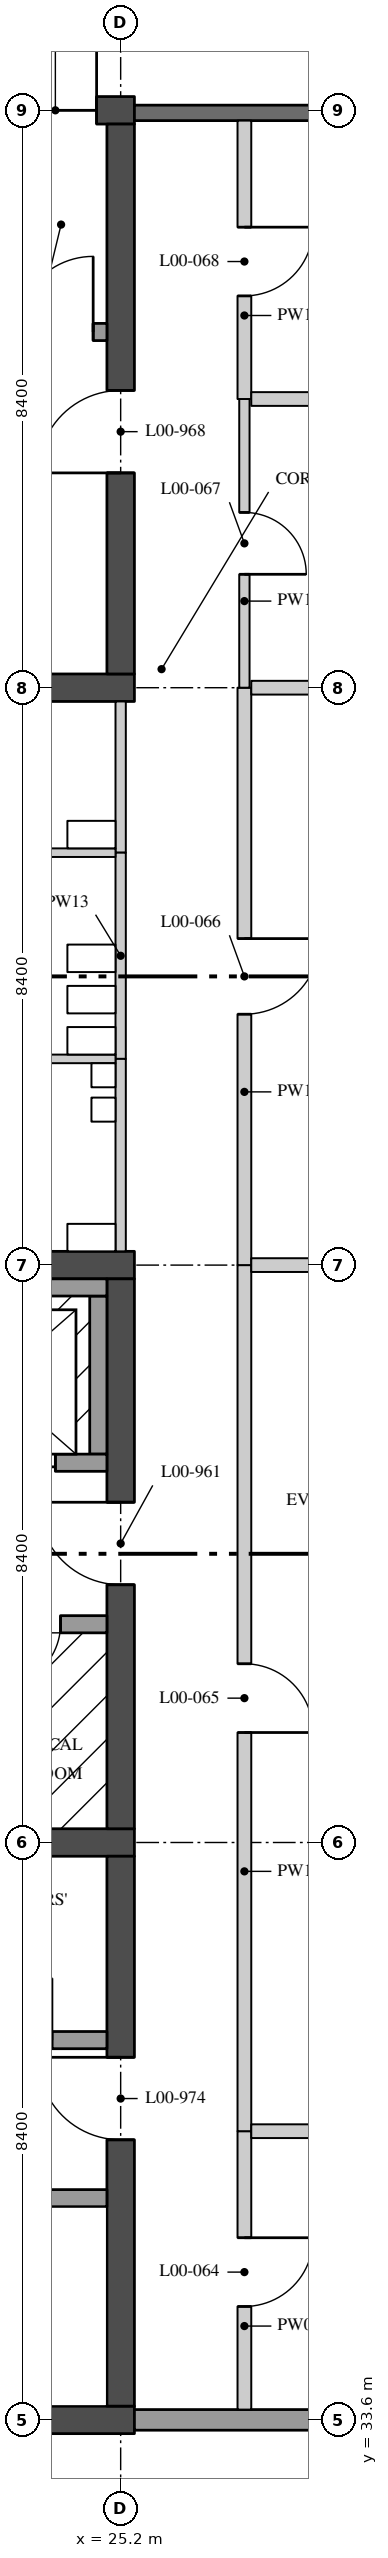
"""IFC4 building model, lengths in metres.
Left out: names, types, materials, properties, quantities, classifications, styles, units other than length and angle.
Written with IfcOpenShell. Run it as: python <this file> out.ifc"""

import sys

from ifc_helpers import new_model, si_unit, direction, frame, frame_2d, origin, place, context, subcontext, project, spatial, rectangle, extrude, element, fill, save


model = new_model("IFC4")
c1 = context("Model", 3, precision=1e-05, world=origin(), true_north=direction((0.0, 1.0)))
c2 = subcontext(c1, "Body", "Model", "MODEL_VIEW")
j1 = project(units=[si_unit("LENGTHUNIT", "METRE"), si_unit("PLANEANGLEUNIT", "RADIAN")], contexts=[c1])
p1 = place(None, origin())
s1 = spatial("IfcSite", under=j1, at=p1, CompositionType="ELEMENT")
p2 = place(p1, origin())
s2 = spatial("IfcBuilding", under=s1, at=p2, CompositionType="ELEMENT")
p3 = place(p2, origin())
s3 = spatial("IfcBuildingStorey", under=s2, at=p3, CompositionType="ELEMENT", Elevation=0.0)
p4 = place(p3, frame((16.6, 42.0, 0.0), z_axis=(0.0, 0.0, 1.0), x_axis=(1.0, 0.0, 0.0)))
e1 = element("IfcWall", 1, at=p4, inside=s3, PredefinedType="SHEAR", context=c2, shape_type="SweptSolid", body=[
    extrude(rectangle(XDim=8.8, YDim=0.4, at=frame_2d((4.4, 0.0))), origin(), (0.0, 0.0, 1.0), 5.05),
])
p5 = place(p4, frame((1.05, 0.0, 0.0)))
e2 = element("IfcOpeningElement", 2, at=p5, cuts=e1, PredefinedType="OPENING", context=c2, shape_type="SweptSolid", body=[
    extrude(rectangle(XDim=1.1, YDim=2.1, at=frame_2d((0.55, 1.05))), frame((0.0, 0.21, 0.0), z_axis=(0.0, -1.0, 0.0), x_axis=(1.0, 0.0, 0.0)), (0.0, 0.0, 1.0), 0.42),
])
p6 = place(p3, frame((16.6, 50.4, 0.0), z_axis=(0.0, 0.0, 1.0), x_axis=(1.0, 0.0, 0.0)))
e3 = element("IfcWall", 3, at=p6, inside=s3, PredefinedType="SHEAR", context=c2, shape_type="SweptSolid", body=[
    extrude(rectangle(XDim=8.8, YDim=0.4, at=frame_2d((4.4, 0.0))), origin(), (0.0, 0.0, 1.0), 5.05),
])
p7 = place(p3, frame((25.2, 42.2, 0.0), z_axis=(0.0, 0.0, 1.0), x_axis=(0.0, 1.0, 0.0)))
e4 = element("IfcWall", 4, at=p7, inside=s3, PredefinedType="SHEAR", context=c2, shape_type="SweptSolid", body=[
    extrude(rectangle(XDim=8.0, YDim=0.4, at=frame_2d((4.0, 0.0))), origin(), (0.0, 0.0, 1.0), 5.05),
])
p8 = place(p7, frame((3.55, 0.0, 0.0)))
e5 = element("IfcOpeningElement", 5, at=p8, cuts=e4, PredefinedType="OPENING", context=c2, shape_type="SweptSolid", body=[
    extrude(rectangle(XDim=1.2, YDim=2.1, at=frame_2d((0.6, 1.05))), frame((0.0, 0.21, 0.0), z_axis=(0.0, -1.0, 0.0), x_axis=(1.0, 0.0, 0.0)), (0.0, 0.0, 1.0), 0.42),
])
p9 = place(p3, frame((25.0, 45.175, 0.0), z_axis=(0.0, 0.0, 1.0), x_axis=(-1.0, 0.0, 0.0)))
e6 = element("IfcWall", 6, at=p9, inside=s3, PredefinedType="SOLIDWALL", context=c2, shape_type="SweptSolid", body=[
    extrude(rectangle(XDim=2.25, YDim=0.25, at=frame_2d((1.125, 0.0))), origin(), (0.0, 0.0, 1.0), 5.05),
])
p10 = place(p9, frame((0.675, 0.0, 0.0)))
e7 = element("IfcOpeningElement", 7, at=p10, cuts=e6, PredefinedType="OPENING", context=c2, shape_type="SweptSolid", body=[
    extrude(rectangle(XDim=0.9, YDim=2.1, at=frame_2d((0.45, 1.05))), frame((0.0, 0.135, 0.0), z_axis=(0.0, -1.0, 0.0), x_axis=(1.0, 0.0, 0.0)), (0.0, 0.0, 1.0), 0.27),
])
p11 = place(p3, frame((16.6, 58.8, 0.0), z_axis=(0.0, 0.0, 1.0), x_axis=(1.0, 0.0, 0.0)))
e8 = element("IfcWall", 8, at=p11, inside=s3, PredefinedType="SHEAR", context=c2, shape_type="SweptSolid", body=[
    extrude(rectangle(XDim=8.8, YDim=0.4, at=frame_2d((4.4, 0.0))), origin(), (0.0, 0.0, 1.0), 5.05),
])
p12 = place(p3, frame((16.6, 67.2, 0.0), z_axis=(0.0, 0.0, 1.0), x_axis=(1.0, 0.0, 0.0)))
e9 = element("IfcWall", 9, at=p12, inside=s3, PredefinedType="SHEAR", context=c2, shape_type="SweptSolid", body=[
    extrude(rectangle(XDim=8.8, YDim=0.4, at=frame_2d((4.4, 0.0))), origin(), (0.0, 0.0, 1.0), 5.05),
])
p13 = place(p12, frame((7.05, 0.0, 0.0)))
e10 = element("IfcOpeningElement", 10, at=p13, cuts=e9, PredefinedType="OPENING", context=c2, shape_type="SweptSolid", body=[
    extrude(rectangle(XDim=1.2, YDim=2.1, at=frame_2d((0.6, 1.05))), frame((0.0, 0.21, 0.0), z_axis=(0.0, -1.0, 0.0), x_axis=(1.0, 0.0, 0.0)), (0.0, 0.0, 1.0), 0.42),
])
p14 = place(p3, frame((25.2, 59.0, 0.0), z_axis=(0.0, 0.0, 1.0), x_axis=(0.0, 1.0, 0.0)))
e11 = element("IfcWall", 11, at=p14, inside=s3, PredefinedType="SHEAR", context=c2, shape_type="SweptSolid", body=[
    extrude(rectangle(XDim=8.0, YDim=0.4, at=frame_2d((4.0, 0.0))), origin(), (0.0, 0.0, 1.0), 5.05),
])
p15 = place(p14, frame((2.925, 0.0, 0.0)))
e12 = element("IfcOpeningElement", 12, at=p15, cuts=e11, PredefinedType="OPENING", context=c2, shape_type="SweptSolid", body=[
    extrude(rectangle(XDim=1.2, YDim=2.1, at=frame_2d((0.6, 1.05))), frame((0.0, 0.21, 0.0), z_axis=(0.0, -1.0, 0.0), x_axis=(1.0, 0.0, 0.0)), (0.0, 0.0, 1.0), 0.42),
])
p16 = place(p3, frame((25.0, 63.975, 0.0), z_axis=(0.0, 0.0, 1.0), x_axis=(-1.0, 0.0, 0.0)))
e13 = element("IfcWall", 13, at=p16, inside=s3, PredefinedType="SOLIDWALL", context=c2, shape_type="SweptSolid", body=[
    extrude(rectangle(XDim=8.0, YDim=0.25, at=frame_2d((4.0, 0.0))), origin(), (0.0, 0.0, 1.0), 5.05),
])
p17 = place(p16, frame((0.2, 0.0, 0.0)))
e14 = element("IfcOpeningElement", 14, at=p17, cuts=e13, PredefinedType="OPENING", context=c2, shape_type="SweptSolid", body=[
    extrude(rectangle(XDim=1.1, YDim=2.1, at=frame_2d((0.55, 1.05))), frame((0.0, 0.135, 0.0), z_axis=(0.0, -1.0, 0.0), x_axis=(1.0, 0.0, 0.0)), (0.0, 0.0, 1.0), 0.27),
])
p18 = place(p3, frame((16.6, 33.6, 0.0), z_axis=(0.0, 0.0, 1.0), x_axis=(1.0, 0.0, 0.0)))
e15 = element("IfcWall", 15, at=p18, inside=s3, PredefinedType="SHEAR", context=c2, shape_type="SweptSolid", body=[
    extrude(rectangle(XDim=8.8, YDim=0.4, at=frame_2d((4.4, 0.0))), origin(), (0.0, 0.0, 1.0), 5.05),
])
p19 = place(p3, frame((25.2, 33.8, 0.0), z_axis=(0.0, 0.0, 1.0), x_axis=(0.0, 1.0, 0.0)))
e16 = element("IfcWall", 16, at=p19, inside=s3, PredefinedType="SHEAR", context=c2, shape_type="SweptSolid", body=[
    extrude(rectangle(XDim=8.0, YDim=0.4, at=frame_2d((4.0, 0.0))), origin(), (0.0, 0.0, 1.0), 5.05),
])
p20 = place(p19, frame((3.875, 0.0, 0.0)))
e17 = element("IfcOpeningElement", 17, at=p20, cuts=e16, PredefinedType="OPENING", context=c2, shape_type="SweptSolid", body=[
    extrude(rectangle(XDim=1.2, YDim=2.1, at=frame_2d((0.6, 1.05))), frame((0.0, 0.21, 0.0), z_axis=(0.0, -1.0, 0.0), x_axis=(1.0, 0.0, 0.0)), (0.0, 0.0, 1.0), 0.42),
])
p21 = place(p3, frame((17.0, 36.825, 0.0), z_axis=(0.0, 0.0, 1.0), x_axis=(1.0, 0.0, 0.0)))
e18 = element("IfcWall", 18, at=p21, inside=s3, PredefinedType="SOLIDWALL", context=c2, shape_type="SweptSolid", body=[
    extrude(rectangle(XDim=8.0, YDim=0.25, at=frame_2d((4.0, 0.0))), origin(), (0.0, 0.0, 1.0), 5.05),
])
p22 = place(p21, frame((0.2, 0.0, 0.0)))
e19 = element("IfcOpeningElement", 19, at=p22, cuts=e18, PredefinedType="OPENING", context=c2, shape_type="SweptSolid", body=[
    extrude(rectangle(XDim=1.1, YDim=2.1, at=frame_2d((0.55, 1.05))), frame((0.0, 0.135, 0.0), z_axis=(0.0, -1.0, 0.0), x_axis=(1.0, 0.0, 0.0)), (0.0, 0.0, 1.0), 0.27),
])
p23 = place(p3, frame((19.65, 39.125, 0.0), z_axis=(0.0, 0.0, 1.0), x_axis=(1.0, 0.0, 0.0)))
e20 = element("IfcWall", 20, at=p23, inside=s3, PredefinedType="SOLIDWALL", context=c2, shape_type="SweptSolid", body=[
    extrude(rectangle(XDim=5.35, YDim=0.25, at=frame_2d((2.675, 0.0))), origin(), (0.0, 0.0, 1.0), 5.05),
])
p24 = place(p23, frame((3.65, 0.0, 0.0)))
e21 = element("IfcOpeningElement", 21, at=p24, cuts=e20, PredefinedType="OPENING", context=c2, shape_type="SweptSolid", body=[
    extrude(rectangle(XDim=0.9, YDim=2.1, at=frame_2d((0.45, 1.05))), frame((0.0, 0.135, 0.0), z_axis=(0.0, -1.0, 0.0), x_axis=(1.0, 0.0, 0.0)), (0.0, 0.0, 1.0), 0.27),
])
p25 = place(p23, frame((0.9, 0.0, 0.0)))
e22 = element("IfcOpeningElement", 22, at=p25, cuts=e20, PredefinedType="OPENING", context=c2, shape_type="SweptSolid", body=[
    extrude(rectangle(XDim=0.8, YDim=2.1, at=frame_2d((0.4, 1.05))), frame((0.0, 0.135, 0.0), z_axis=(0.0, -1.0, 0.0), x_axis=(1.0, 0.0, 0.0)), (0.0, 0.0, 1.0), 0.27),
])
p26 = place(p3, frame((24.875, 47.65, 0.0), z_axis=(0.0, 0.0, 1.0), x_axis=(0.0, 1.0, 0.0)))
e23 = element("IfcWall", 23, at=p26, inside=s3, PredefinedType="SOLIDWALL", context=c2, shape_type="SweptSolid", body=[
    extrude(rectangle(XDim=2.3, YDim=0.25, at=frame_2d((1.15, 0.0))), origin(), (0.0, 0.0, 1.0), 5.05),
])
p27 = place(p3, frame((21.7, 50.075, 0.0), z_axis=(0.0, 0.0, 1.0), x_axis=(1.0, 0.0, 0.0)))
e24 = element("IfcWall", 24, at=p27, inside=s3, PredefinedType="SOLIDWALL", context=c2, shape_type="SweptSolid", body=[
    extrude(rectangle(XDim=3.3, YDim=0.25, at=frame_2d((1.65, 0.0))), origin(), (0.0, 0.0, 1.0), 5.05),
])
p28 = place(p3, frame((21.7, 47.525, 0.0), z_axis=(0.0, 0.0, 1.0), x_axis=(1.0, 0.0, 0.0)))
e25 = element("IfcWall", 25, at=p28, inside=s3, PredefinedType="SOLIDWALL", context=c2, shape_type="SweptSolid", body=[
    extrude(rectangle(XDim=3.3, YDim=0.25, at=frame_2d((1.65, 0.0))), origin(), (0.0, 0.0, 1.0), 5.05),
])
p29 = place(p28, frame((0.75, 0.0, 0.0)))
e26 = element("IfcOpeningElement", 26, at=p29, cuts=e25, PredefinedType="OPENING", context=c2, shape_type="SweptSolid", body=[
    extrude(rectangle(XDim=1.8, YDim=2.1, at=frame_2d((0.9, 1.05))), frame((0.0, 0.135, 0.0), z_axis=(0.0, -1.0, 0.0), x_axis=(1.0, 0.0, 0.0)), (0.0, 0.0, 1.0), 0.27),
])
p30 = place(p3, frame((27.0, 33.75, 0.0), z_axis=(0.0, 0.0, 1.0), x_axis=(0.0, 1.0, 0.0)))
e27 = element("IfcWall", 27, at=p30, inside=s3, PredefinedType="PARTITIONING", context=c2, shape_type="SweptSolid", body=[
    extrude(rectangle(XDim=4.05, YDim=0.2, at=frame_2d((2.025, 0.0))), origin(), (0.0, 0.0, 1.0), 5.05),
])
p31 = place(p30, frame((1.5, 0.0, 0.0)))
e28 = element("IfcOpeningElement", 28, at=p31, cuts=e27, PredefinedType="OPENING", context=c2, shape_type="SweptSolid", body=[
    extrude(rectangle(XDim=1.0, YDim=2.4, at=frame_2d((0.5, 1.2))), frame((0.0, 0.11, 0.0), z_axis=(0.0, -1.0, 0.0), x_axis=(1.0, 0.0, 0.0)), (0.0, 0.0, 1.0), 0.22),
])
p32 = place(p3, frame((27.0, 37.8, 0.0), z_axis=(0.0, 0.0, 1.0), x_axis=(0.0, 1.0, 0.0)))
e29 = element("IfcWall", 29, at=p32, inside=s3, PredefinedType="PARTITIONING", context=c2, shape_type="SweptSolid", body=[
    extrude(rectangle(XDim=12.6, YDim=0.2, at=frame_2d((6.3, 0.0))), origin(), (0.0, 0.0, 1.0), 5.05),
])
p33 = place(p32, frame((5.8, 0.0, 0.0)))
e30 = element("IfcOpeningElement", 30, at=p33, cuts=e29, PredefinedType="OPENING", context=c2, shape_type="SweptSolid", body=[
    extrude(rectangle(XDim=1.0, YDim=2.1, at=frame_2d((0.5, 1.05))), frame((0.0, 0.11, 0.0), z_axis=(0.0, -1.0, 0.0), x_axis=(1.0, 0.0, 0.0)), (0.0, 0.0, 1.0), 0.22),
])
p34 = place(p3, frame((27.0, 50.4, 0.0), z_axis=(0.0, 0.0, 1.0), x_axis=(0.0, 1.0, 0.0)))
e31 = element("IfcWall", 31, at=p34, inside=s3, PredefinedType="PARTITIONING", context=c2, shape_type="SweptSolid", body=[
    extrude(rectangle(XDim=8.4, YDim=0.2, at=frame_2d((4.2, 0.0))), origin(), (0.0, 0.0, 1.0), 5.05),
])
p35 = place(p34, frame((3.65, 0.0, 0.0)))
e32 = element("IfcOpeningElement", 32, at=p35, cuts=e31, PredefinedType="OPENING", context=c2, shape_type="SweptSolid", body=[
    extrude(rectangle(XDim=1.1, YDim=2.1, at=frame_2d((0.55, 1.05))), frame((0.0, 0.11, 0.0), z_axis=(0.0, -1.0, 0.0), x_axis=(1.0, 0.0, 0.0)), (0.0, 0.0, 1.0), 0.22),
])
p36 = place(p3, frame((27.0, 58.8, 0.0), z_axis=(0.0, 0.0, 1.0), x_axis=(0.0, 1.0, 0.0)))
e33 = element("IfcWall", 33, at=p36, inside=s3, PredefinedType="PARTITIONING", context=c2, shape_type="SweptSolid", body=[
    extrude(rectangle(XDim=4.2, YDim=0.15, at=frame_2d((2.1, 0.0))), origin(), (0.0, 0.0, 1.0), 5.05),
])
p37 = place(p36, frame((1.65, 0.0, 0.0)))
e34 = element("IfcOpeningElement", 34, at=p37, cuts=e33, PredefinedType="OPENING", context=c2, shape_type="SweptSolid", body=[
    extrude(rectangle(XDim=0.9, YDim=2.1, at=frame_2d((0.45, 1.05))), frame((0.0, 0.085, 0.0), z_axis=(0.0, -1.0, 0.0), x_axis=(1.0, 0.0, 0.0)), (0.0, 0.0, 1.0), 0.17),
])
p38 = place(p3, frame((27.0, 63.0, 0.0), z_axis=(0.0, 0.0, 1.0), x_axis=(0.0, 1.0, 0.0)))
e35 = element("IfcWall", 35, at=p38, inside=s3, PredefinedType="PARTITIONING", context=c2, shape_type="SweptSolid", body=[
    extrude(rectangle(XDim=4.05, YDim=0.2, at=frame_2d((2.025, 0.0))), origin(), (0.0, 0.0, 1.0), 5.05),
])
p39 = place(p38, frame((1.5, 0.0, 0.0)))
e36 = element("IfcOpeningElement", 36, at=p39, cuts=e35, PredefinedType="OPENING", context=c2, shape_type="SweptSolid", body=[
    extrude(rectangle(XDim=1.0, YDim=2.1, at=frame_2d((0.5, 1.05))), frame((0.0, 0.11, 0.0), z_axis=(0.0, -1.0, 0.0), x_axis=(1.0, 0.0, 0.0)), (0.0, 0.0, 1.0), 0.22),
])
p40 = place(p3, frame((25.2, 56.4, 0.0), z_axis=(0.0, 0.0, 1.0), x_axis=(0.0, 1.0, 0.0)))
e37 = element("IfcWall", 37, at=p40, inside=s3, PredefinedType="PARTITIONING", context=c2, shape_type="SweptSolid", body=[
    extrude(rectangle(XDim=2.2, YDim=0.15, at=frame_2d((1.1, 0.0))), origin(), (0.0, 0.0, 1.0), 5.05),
])
p41 = place(p3, frame((25.2, 53.4, 0.0), z_axis=(0.0, 0.0, 1.0), x_axis=(0.0, 1.0, 0.0)))
e38 = element("IfcWall", 38, at=p41, inside=s3, PredefinedType="PARTITIONING", context=c2, shape_type="SweptSolid", body=[
    extrude(rectangle(XDim=3.0, YDim=0.15, at=frame_2d((1.5, 0.0))), origin(), (0.0, 0.0, 1.0), 5.05),
])
p42 = place(p3, frame((25.2, 50.6, 0.0), z_axis=(0.0, 0.0, 1.0), x_axis=(0.0, 1.0, 0.0)))
e39 = element("IfcWall", 39, at=p42, inside=s3, PredefinedType="PARTITIONING", context=c2, shape_type="SweptSolid", body=[
    extrude(rectangle(XDim=2.8, YDim=0.15, at=frame_2d((1.4, 0.0))), origin(), (0.0, 0.0, 1.0), 5.05),
])
p43 = place(p3, frame((27.1, 37.8, 0.0), z_axis=(0.0, 0.0, 1.0), x_axis=(1.0, 0.0, 0.0)))
e40 = element("IfcWall", 40, at=p43, inside=s3, PredefinedType="PARTITIONING", context=c2, shape_type="SweptSolid", body=[
    extrude(rectangle(XDim=6.35, YDim=0.2, at=frame_2d((3.175, 0.0))), origin(), (0.0, 0.0, 1.0), 5.05),
])
for number, where, z_axis, x_axis in (
    (41, (27.1, 50.4, 0.0), (0.0, 0.0, 1.0), (1.0, 0.0, 0.0)),
    (42, (27.1, 58.8, 0.0), (0.0, 0.0, 1.0), (1.0, 0.0, 0.0)),
):
    element("IfcWall", number, at=place(p3, frame(where, z_axis=z_axis, x_axis=x_axis)), inside=s3, PredefinedType="PARTITIONING", context=c2, shape_type="SweptSolid", body=[
        extrude(rectangle(XDim=6.05, YDim=0.2, at=frame_2d((3.025, 0.0))), origin(), (0.0, 0.0, 1.0), 5.05),
    ])
p44 = place(p3, frame((27.1, 63.0, 0.0), z_axis=(0.0, 0.0, 1.0), x_axis=(1.0, 0.0, 0.0)))
e43 = element("IfcWall", 43, at=p44, inside=s3, PredefinedType="PARTITIONING", context=c2, shape_type="SweptSolid", body=[
    extrude(rectangle(XDim=6.35, YDim=0.2, at=frame_2d((3.175, 0.0))), origin(), (0.0, 0.0, 1.0), 5.05),
])
for number, where, z_axis, x_axis in (
    (44, (19.262, 56.4, 0.0), (0.0, 0.0, 1.0), (1.0, 0.0, 0.0)),
    (45, (19.262, 53.4, 0.0), (0.0, 0.0, 1.0), (1.0, 0.0, 0.0)),
):
    element("IfcWall", number, at=place(p3, frame(where, z_axis=z_axis, x_axis=x_axis)), inside=s3, PredefinedType="PARTITIONING", context=c2, shape_type="SweptSolid", body=[
        extrude(rectangle(XDim=5.863, YDim=0.125, at=frame_2d((2.932, 0.0))), origin(), (0.0, 0.0, 1.0), 5.05),
    ])
p45 = place(p3, frame((33.17, 67.163, 0.0), z_axis=(0.0, 0.0, 1.0), x_axis=(-1.0, 0.0, 0.0)))
e46 = element("IfcWall", 46, at=p45, inside=s3, PredefinedType="SOLIDWALL", context=c2, shape_type="SweptSolid", body=[
    extrude(rectangle(XDim=7.77, YDim=0.225, at=frame_2d((3.885, 0.0))), origin(), (0.0, 0.0, 1.0), 5.05),
])
p46 = place(p45, frame((0.395, 0.0, 1.2)))
e47 = element("IfcOpeningElement", 47, at=p46, cuts=e46, PredefinedType="OPENING", context=c2, shape_type="SweptSolid", body=[
    extrude(rectangle(XDim=0.45, YDim=2.85, at=frame_2d((0.225, 1.425))), frame((0.0, 0.123, 0.0), z_axis=(0.0, -1.0, 0.0), x_axis=(1.0, 0.0, 0.0)), (0.0, 0.0, 1.0), 0.245),
])
p47 = place(p45, frame((2.12, 0.0, 1.2)))
e48 = element("IfcOpeningElement", 48, at=p47, cuts=e46, PredefinedType="OPENING", context=c2, shape_type="SweptSolid", body=[
    extrude(rectangle(XDim=1.2, YDim=2.85, at=frame_2d((0.6, 1.425))), frame((0.0, 0.123, 0.0), z_axis=(0.0, -1.0, 0.0), x_axis=(1.0, 0.0, 0.0)), (0.0, 0.0, 1.0), 0.245),
])
p48 = place(p45, frame((4.595, 0.0, 1.2)))
e49 = element("IfcOpeningElement", 49, at=p48, cuts=e46, PredefinedType="OPENING", context=c2, shape_type="SweptSolid", body=[
    extrude(rectangle(XDim=0.45, YDim=2.85, at=frame_2d((0.225, 1.425))), frame((0.0, 0.123, 0.0), z_axis=(0.0, -1.0, 0.0), x_axis=(1.0, 0.0, 0.0)), (0.0, 0.0, 1.0), 0.245),
])
p49 = place(p3, frame((33.17, 33.6, 0.0), z_axis=(0.0, 0.0, 1.0), x_axis=(-1.0, 0.0, 0.0)))
e50 = element("IfcWall", 50, at=p49, inside=s3, PredefinedType="SOLIDWALL", context=c2, shape_type="SweptSolid", body=[
    extrude(rectangle(XDim=7.77, YDim=0.3, at=frame_2d((3.885, 0.0))), origin(), (0.0, 0.0, 1.0), 5.05),
])
p50 = place(p8, origin())
e51 = element("IfcDoor", 51, at=p50, inside=s3, OperationType="SINGLE_SWING_LEFT", PredefinedType="DOOR", context=c2, shape_type="SweptSolid", body=[
    extrude(rectangle(XDim=1.2, YDim=2.1, at=frame_2d((0.6, 1.05))), frame((0.0, 0.035, 0.0), z_axis=(0.0, -1.0, 0.0), x_axis=(1.0, 0.0, 0.0)), (0.0, 0.0, 1.0), 0.07),
])
fill(e5, e51)
p51 = place(p10, origin())
e52 = element("IfcDoor", 52, at=p51, inside=s3, OperationType="SINGLE_SWING_LEFT", PredefinedType="DOOR", context=c2, shape_type="SweptSolid", body=[
    extrude(rectangle(XDim=0.9, YDim=2.1, at=frame_2d((0.45, 1.05))), frame((0.0, 0.05, 0.0), z_axis=(0.0, -1.0, 0.0), x_axis=(1.0, 0.0, 0.0)), (0.0, 0.0, 1.0), 0.1),
])
fill(e7, e52)
p52 = place(p15, origin())
e53 = element("IfcDoor", 53, at=p52, inside=s3, OperationType="SINGLE_SWING_RIGHT", PredefinedType="DOOR", context=c2, shape_type="SweptSolid", body=[
    extrude(rectangle(XDim=1.2, YDim=2.1, at=frame_2d((0.6, 1.05))), frame((0.0, 0.035, 0.0), z_axis=(0.0, -1.0, 0.0), x_axis=(1.0, 0.0, 0.0)), (0.0, 0.0, 1.0), 0.07),
])
fill(e12, e53)
p53 = place(p17, frame((1.1, 0.0, 0.0), z_axis=(0.0, 0.0, 1.0), x_axis=(-1.0, 0.0, 0.0)))
e54 = element("IfcDoor", 54, at=p53, inside=s3, OperationType="SINGLE_SWING_LEFT", PredefinedType="DOOR", context=c2, shape_type="SweptSolid", body=[
    extrude(rectangle(XDim=1.1, YDim=2.1, at=frame_2d((0.55, 1.05))), frame((0.0, 0.035, 0.0), z_axis=(0.0, -1.0, 0.0), x_axis=(1.0, 0.0, 0.0)), (0.0, 0.0, 1.0), 0.07),
])
fill(e14, e54)
p54 = place(p13, origin())
e55 = element("IfcDoor", 55, at=p54, inside=s3, OperationType="SINGLE_SWING_LEFT", PredefinedType="DOOR", context=c2, shape_type="SweptSolid", body=[
    extrude(rectangle(XDim=1.2, YDim=2.1, at=frame_2d((0.6, 1.05))), frame((0.0, 0.035, 0.0), z_axis=(0.0, -1.0, 0.0), x_axis=(1.0, 0.0, 0.0)), (0.0, 0.0, 1.0), 0.07),
])
fill(e10, e55)
p55 = place(p20, origin())
e56 = element("IfcDoor", 56, at=p55, inside=s3, OperationType="SINGLE_SWING_LEFT", PredefinedType="DOOR", context=c2, shape_type="SweptSolid", body=[
    extrude(rectangle(XDim=1.2, YDim=2.1, at=frame_2d((0.6, 1.05))), frame((0.0, 0.035, 0.0), z_axis=(0.0, -1.0, 0.0), x_axis=(1.0, 0.0, 0.0)), (0.0, 0.0, 1.0), 0.07),
])
fill(e17, e56)
p56 = place(p29, origin())
e57 = element("IfcDoor", 57, at=p56, inside=s3, OperationType="DOUBLE_DOOR_SLIDING", PredefinedType="DOOR", context=c2, shape_type="SweptSolid", body=[
    extrude(rectangle(XDim=1.8, YDim=2.1, at=frame_2d((0.9, 1.05))), frame((0.0, 0.04, 0.0), z_axis=(0.0, -1.0, 0.0), x_axis=(1.0, 0.0, 0.0)), (0.0, 0.0, 1.0), 0.08),
])
fill(e26, e57)
p57 = place(p31, frame((1.0, 0.0, 0.0), z_axis=(0.0, 0.0, 1.0), x_axis=(-1.0, 0.0, 0.0)))
e58 = element("IfcDoor", 58, at=p57, inside=s3, OperationType="SINGLE_SWING_RIGHT", PredefinedType="DOOR", context=c2, shape_type="SweptSolid", body=[
    extrude(rectangle(XDim=1.0, YDim=2.4, at=frame_2d((0.5, 1.2))), frame((0.0, 0.03, 0.0), z_axis=(0.0, -1.0, 0.0), x_axis=(1.0, 0.0, 0.0)), (0.0, 0.0, 1.0), 0.06),
])
fill(e28, e58)
p58 = place(p33, frame((1.0, 0.0, 0.0), z_axis=(0.0, 0.0, 1.0), x_axis=(-1.0, 0.0, 0.0)))
e59 = element("IfcDoor", 59, at=p58, inside=s3, OperationType="SINGLE_SWING_LEFT", PredefinedType="DOOR", context=c2, shape_type="SweptSolid", body=[
    extrude(rectangle(XDim=1.0, YDim=2.1, at=frame_2d((0.5, 1.05))), frame((0.0, 0.055, 0.0), z_axis=(0.0, -1.0, 0.0), x_axis=(1.0, 0.0, 0.0)), (0.0, 0.0, 1.0), 0.11),
])
fill(e30, e59)
p59 = place(p35, frame((1.1, 0.0, 0.0), z_axis=(0.0, 0.0, 1.0), x_axis=(-1.0, 0.0, 0.0)))
e60 = element("IfcDoor", 60, at=p59, inside=s3, OperationType="SINGLE_SWING_RIGHT", PredefinedType="DOOR", context=c2, shape_type="SweptSolid", body=[
    extrude(rectangle(XDim=1.1, YDim=2.1, at=frame_2d((0.55, 1.05))), frame((0.0, 0.025, 0.0), z_axis=(0.0, -1.0, 0.0), x_axis=(1.0, 0.0, 0.0)), (0.0, 0.0, 1.0), 0.05),
])
fill(e32, e60)
p60 = place(p37, frame((0.9, 0.0, 0.0), z_axis=(0.0, 0.0, 1.0), x_axis=(-1.0, 0.0, 0.0)))
e61 = element("IfcDoor", 61, at=p60, inside=s3, OperationType="SINGLE_SWING_LEFT", PredefinedType="DOOR", context=c2, shape_type="SweptSolid", body=[
    extrude(rectangle(XDim=0.9, YDim=2.1, at=frame_2d((0.45, 1.05))), frame((0.0, 0.025, 0.0), z_axis=(0.0, -1.0, 0.0), x_axis=(1.0, 0.0, 0.0)), (0.0, 0.0, 1.0), 0.05),
])
fill(e34, e61)
p61 = place(p39, frame((1.0, 0.0, 0.0), z_axis=(0.0, 0.0, 1.0), x_axis=(-1.0, 0.0, 0.0)))
e62 = element("IfcDoor", 62, at=p61, inside=s3, OperationType="SINGLE_SWING_RIGHT", PredefinedType="DOOR", context=c2, shape_type="SweptSolid", body=[
    extrude(rectangle(XDim=1.0, YDim=2.1, at=frame_2d((0.5, 1.05))), frame((0.0, 0.025, 0.0), z_axis=(0.0, -1.0, 0.0), x_axis=(1.0, 0.0, 0.0)), (0.0, 0.0, 1.0), 0.05),
])
fill(e36, e62)
save(model, sys.argv[1])
